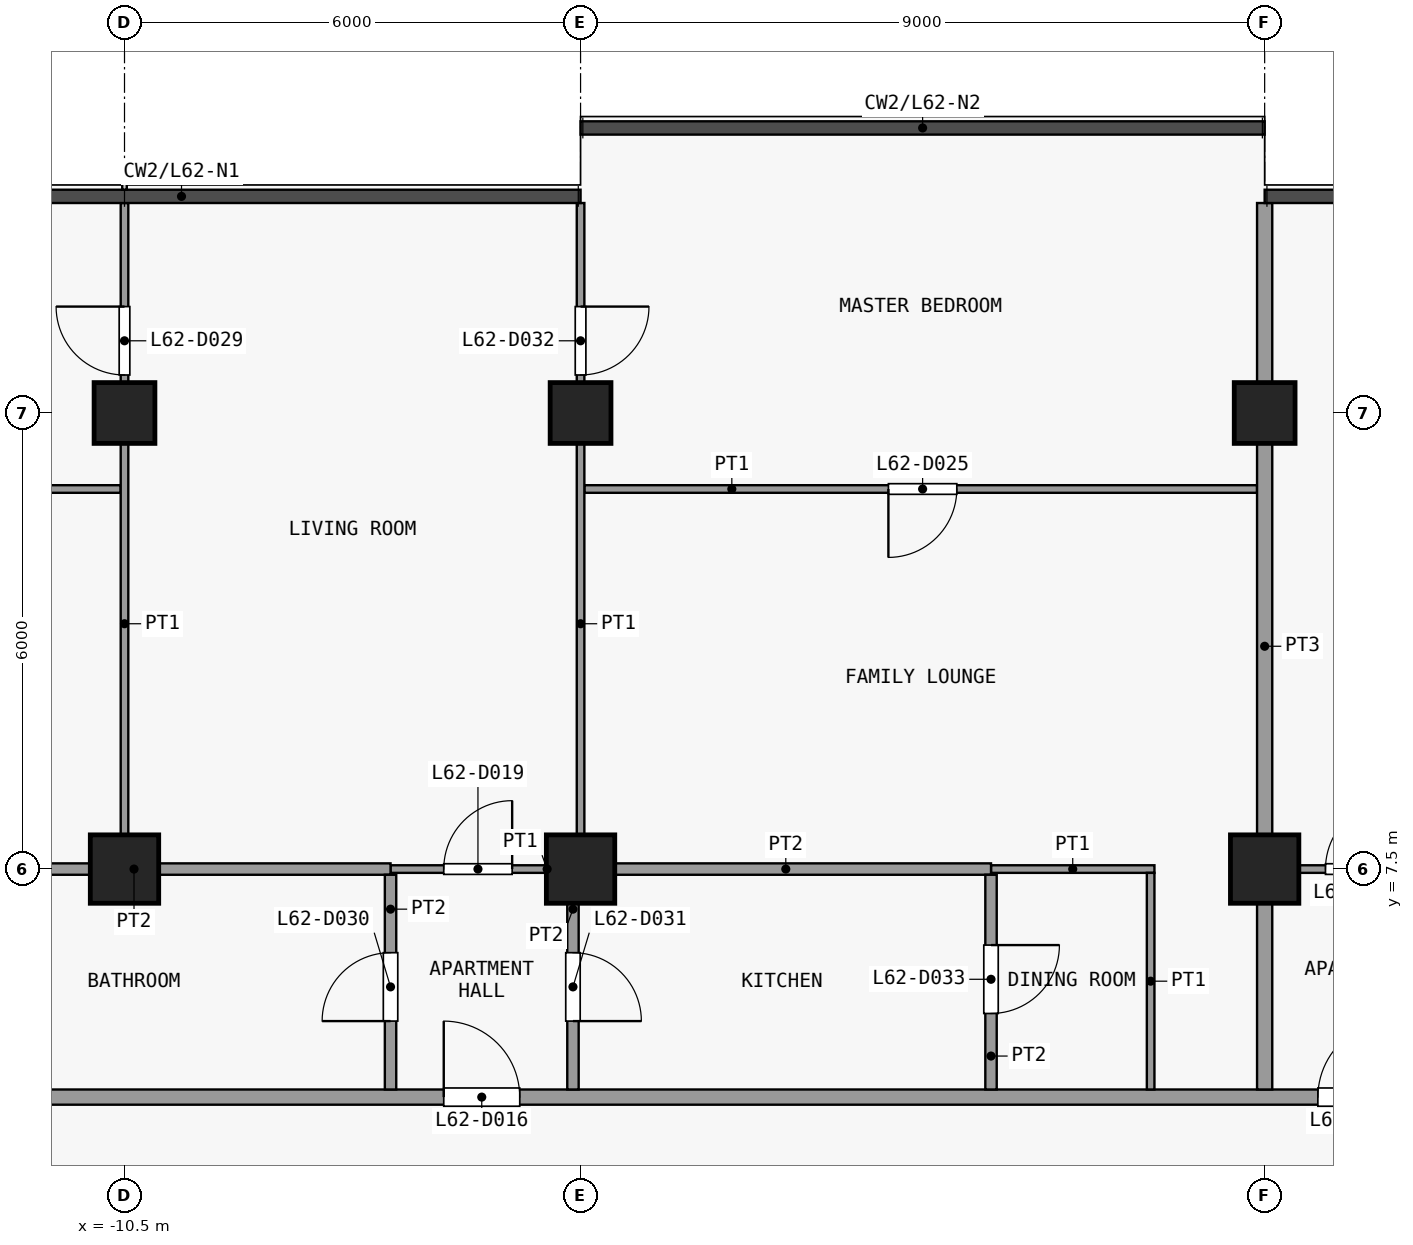
"""IFC4 building model, lengths in metres.
Left out: names, types, materials, properties, quantities, classifications, styles, units other than length and angle.
Written with IfcOpenShell. Run it as: python <this file> out.ifc"""

import sys

from ifc_helpers import new_model, si_unit, direction, frame, frame_2d, origin, origin_2d, place, context, subcontext, project, spatial, rectangle, extrude, element, fill, save


model = new_model("IFC4")
c1 = context("Model", 3, precision=1e-05, world=origin(), true_north=direction((0.0, 1.0)))
c2 = subcontext(c1, "Body", "Model", "MODEL_VIEW")
j1 = project(units=[si_unit("LENGTHUNIT", "METRE"), si_unit("PLANEANGLEUNIT", "RADIAN")], contexts=[c1])
p1 = place(None, origin())
s1 = spatial("IfcSite", under=j1, at=p1, CompositionType="ELEMENT")
p2 = place(p1, origin())
s2 = spatial("IfcBuilding", under=s1, at=p2, CompositionType="ELEMENT")
p3 = place(p2, frame((0.0, 0.0, 244.7)))
s3 = spatial("IfcBuildingStorey", under=s2, at=p3, CompositionType="ELEMENT", Elevation=244.7)
p4 = place(p3, frame((-10.5, 7.5, 0.0), z_axis=(0.0, 0.0, 1.0), x_axis=(1.0, 0.0, 0.0)))
e1 = element("IfcColumn", 1, at=p4, inside=s3, PredefinedType="COLUMN", context=c2, shape_type="SweptSolid", body=[
    extrude(rectangle(XDim=0.9, YDim=0.9, at=origin_2d()), origin(), (0.0, 0.0, 1.0), 3.6),
])
p5 = place(p3, frame((-10.5, 13.5, 0.0), z_axis=(0.0, 0.0, 1.0), x_axis=(1.0, 0.0, 0.0)))
e2 = element("IfcColumn", 2, at=p5, inside=s3, PredefinedType="COLUMN", context=c2, shape_type="SweptSolid", body=[
    extrude(rectangle(XDim=0.8, YDim=0.8, at=origin_2d()), origin(), (0.0, 0.0, 1.0), 3.6),
])
p6 = place(p3, frame((-4.5, 7.5, 0.0), z_axis=(0.0, 0.0, 1.0), x_axis=(1.0, 0.0, 0.0)))
e3 = element("IfcColumn", 3, at=p6, inside=s3, PredefinedType="COLUMN", context=c2, shape_type="SweptSolid", body=[
    extrude(rectangle(XDim=0.9, YDim=0.9, at=origin_2d()), origin(), (0.0, 0.0, 1.0), 3.6),
])
p7 = place(p3, frame((-4.5, 13.5, 0.0), z_axis=(0.0, 0.0, 1.0), x_axis=(1.0, 0.0, 0.0)))
e4 = element("IfcColumn", 4, at=p7, inside=s3, PredefinedType="COLUMN", context=c2, shape_type="SweptSolid", body=[
    extrude(rectangle(XDim=0.8, YDim=0.8, at=origin_2d()), origin(), (0.0, 0.0, 1.0), 3.6),
])
p8 = place(p3, frame((4.5, 7.5, 0.0), z_axis=(0.0, 0.0, 1.0), x_axis=(1.0, 0.0, 0.0)))
e5 = element("IfcColumn", 5, at=p8, inside=s3, PredefinedType="COLUMN", context=c2, shape_type="SweptSolid", body=[
    extrude(rectangle(XDim=0.9, YDim=0.9, at=origin_2d()), origin(), (0.0, 0.0, 1.0), 3.6),
])
p9 = place(p3, frame((4.5, 13.5, 0.0), z_axis=(0.0, 0.0, 1.0), x_axis=(1.0, 0.0, 0.0)))
e6 = element("IfcColumn", 6, at=p9, inside=s3, PredefinedType="COLUMN", context=c2, shape_type="SweptSolid", body=[
    extrude(rectangle(XDim=0.8, YDim=0.8, at=origin_2d()), origin(), (0.0, 0.0, 1.0), 3.6),
])
p10 = place(p3, frame((-17.85, 4.5, 0.0), z_axis=(0.0, 0.0, 1.0), x_axis=(1.0, 0.0, 0.0)))
e7 = element("IfcWall", 7, at=p10, inside=s3, PredefinedType="PARTITIONING", context=c2, shape_type="SweptSolid", body=[
    extrude(rectangle(XDim=37.2, YDim=0.2, at=frame_2d((18.6, 0.0))), origin(), (0.0, 0.0, 1.0), 3.15),
])
p11 = place(p10, frame((11.55, 0.0, 0.0)))
e8 = element("IfcOpeningElement", 8, at=p11, cuts=e7, PredefinedType="OPENING", context=c2, shape_type="SweptSolid", body=[
    extrude(rectangle(XDim=1.0, YDim=2.1, at=frame_2d((0.5, 1.05))), frame((0.0, 0.11, 0.0), z_axis=(0.0, -1.0, 0.0), x_axis=(1.0, 0.0, 0.0)), (0.0, 0.0, 1.0), 0.22),
])
p12 = place(p10, frame((23.05, 0.0, 0.0)))
e9 = element("IfcOpeningElement", 9, at=p12, cuts=e7, PredefinedType="OPENING", context=c2, shape_type="SweptSolid", body=[
    extrude(rectangle(XDim=1.0, YDim=2.1, at=frame_2d((0.5, 1.05))), frame((0.0, 0.11, 0.0), z_axis=(0.0, -1.0, 0.0), x_axis=(1.0, 0.0, 0.0)), (0.0, 0.0, 1.0), 0.22),
])
p13 = place(p10, frame((31.55, 0.0, 0.0)))
e10 = element("IfcOpeningElement", 10, at=p13, cuts=e7, PredefinedType="OPENING", context=c2, shape_type="SweptSolid", body=[
    extrude(rectangle(XDim=1.0, YDim=2.1, at=frame_2d((0.5, 1.05))), frame((0.0, 0.11, 0.0), z_axis=(0.0, -1.0, 0.0), x_axis=(1.0, 0.0, 0.0)), (0.0, 0.0, 1.0), 0.22),
])
p14 = place(p3, frame((-7.0, 7.5, 0.0), z_axis=(0.0, 0.0, 1.0), x_axis=(1.0, 0.0, 0.0)))
e11 = element("IfcWall", 11, at=p14, inside=s3, PredefinedType="PARTITIONING", context=c2, shape_type="SweptSolid", body=[
    extrude(rectangle(XDim=2.4, YDim=0.1, at=frame_2d((1.2, 0.0))), origin(), (0.0, 0.0, 1.0), 3.15),
])
p15 = place(p14, frame((0.7, 0.0, 0.0)))
e12 = element("IfcOpeningElement", 12, at=p15, cuts=e11, PredefinedType="OPENING", context=c2, shape_type="SweptSolid", body=[
    extrude(rectangle(XDim=0.9, YDim=2.1, at=frame_2d((0.45, 1.05))), frame((0.0, 0.06, 0.0), z_axis=(0.0, -1.0, 0.0), x_axis=(1.0, 0.0, 0.0)), (0.0, 0.0, 1.0), 0.12),
])
p16 = place(p3, frame((0.9, 7.5, 0.0), z_axis=(0.0, 0.0, 1.0), x_axis=(1.0, 0.0, 0.0)))
e13 = element("IfcWall", 13, at=p16, inside=s3, PredefinedType="PARTITIONING", context=c2, shape_type="SweptSolid", body=[
    extrude(rectangle(XDim=2.15, YDim=0.1, at=frame_2d((1.075, 0.0))), origin(), (0.0, 0.0, 1.0), 3.15),
])
p17 = place(p3, frame((4.6, 7.5, 0.0), z_axis=(0.0, 0.0, 1.0), x_axis=(1.0, 0.0, 0.0)))
e14 = element("IfcWall", 14, at=p17, inside=s3, PredefinedType="PARTITIONING", context=c2, shape_type="SweptSolid", body=[
    extrude(rectangle(XDim=2.3, YDim=0.1, at=frame_2d((1.15, 0.0))), origin(), (0.0, 0.0, 1.0), 3.15),
])
p18 = place(p17, frame((0.7, 0.0, 0.0)))
e15 = element("IfcOpeningElement", 15, at=p18, cuts=e14, PredefinedType="OPENING", context=c2, shape_type="SweptSolid", body=[
    extrude(rectangle(XDim=0.9, YDim=2.1, at=frame_2d((0.45, 1.05))), frame((0.0, 0.06, 0.0), z_axis=(0.0, -1.0, 0.0), x_axis=(1.0, 0.0, 0.0)), (0.0, 0.0, 1.0), 0.12),
])
p19 = place(p3, frame((-13.75, 7.5, 0.0), z_axis=(0.0, 0.0, 1.0), x_axis=(1.0, 0.0, 0.0)))
e16 = element("IfcWall", 16, at=p19, inside=s3, PredefinedType="PARTITIONING", context=c2, shape_type="SweptSolid", body=[
    extrude(rectangle(XDim=6.75, YDim=0.15, at=frame_2d((3.375, 0.0))), origin(), (0.0, 0.0, 1.0), 3.15),
])
p20 = place(p3, frame((-4.5, 7.5, 0.0), z_axis=(0.0, 0.0, 1.0), x_axis=(1.0, 0.0, 0.0)))
e17 = element("IfcWall", 17, at=p20, inside=s3, PredefinedType="PARTITIONING", context=c2, shape_type="SweptSolid", body=[
    extrude(rectangle(XDim=5.4, YDim=0.15, at=frame_2d((2.7, 0.0))), origin(), (0.0, 0.0, 1.0), 3.15),
])
p21 = place(p3, frame((-14.85, 12.5, 0.0), z_axis=(0.0, 0.0, 1.0), x_axis=(1.0, 0.0, 0.0)))
e18 = element("IfcWall", 18, at=p21, inside=s3, PredefinedType="PARTITIONING", context=c2, shape_type="SweptSolid", body=[
    extrude(rectangle(XDim=4.3, YDim=0.1, at=frame_2d((2.15, 0.0))), origin(), (0.0, 0.0, 1.0), 3.15),
])
p22 = place(p21, frame((1.7, 0.0, 0.0)))
e19 = element("IfcOpeningElement", 19, at=p22, cuts=e18, PredefinedType="OPENING", context=c2, shape_type="SweptSolid", body=[
    extrude(rectangle(XDim=0.9, YDim=2.1, at=frame_2d((0.45, 1.05))), frame((0.0, 0.06, 0.0), z_axis=(0.0, -1.0, 0.0), x_axis=(1.0, 0.0, 0.0)), (0.0, 0.0, 1.0), 0.12),
])
p23 = place(p3, frame((-4.45, 12.5, 0.0), z_axis=(0.0, 0.0, 1.0), x_axis=(1.0, 0.0, 0.0)))
e20 = element("IfcWall", 20, at=p23, inside=s3, PredefinedType="PARTITIONING", context=c2, shape_type="SweptSolid", body=[
    extrude(rectangle(XDim=8.85, YDim=0.1, at=frame_2d((4.425, 0.0))), origin(), (0.0, 0.0, 1.0), 3.15),
])
p24 = place(p23, frame((4.0, 0.0, 0.0)))
e21 = element("IfcOpeningElement", 21, at=p24, cuts=e20, PredefinedType="OPENING", context=c2, shape_type="SweptSolid", body=[
    extrude(rectangle(XDim=0.9, YDim=2.1, at=frame_2d((0.45, 1.05))), frame((0.0, 0.06, 0.0), z_axis=(0.0, -1.0, 0.0), x_axis=(1.0, 0.0, 0.0)), (0.0, 0.0, 1.0), 0.12),
])
p25 = place(p3, frame((-10.5, 7.575, 0.0), z_axis=(0.0, 0.0, 1.0), x_axis=(0.0, 1.0, 0.0)))
e22 = element("IfcWall", 22, at=p25, inside=s3, PredefinedType="PARTITIONING", context=c2, shape_type="SweptSolid", body=[
    extrude(rectangle(XDim=8.688, YDim=0.1, at=frame_2d((4.344, 0.0))), origin(), (0.0, 0.0, 1.0), 3.15),
])
p26 = place(p25, frame((6.425, 0.0, 0.0)))
e23 = element("IfcOpeningElement", 23, at=p26, cuts=e22, PredefinedType="OPENING", context=c2, shape_type="SweptSolid", body=[
    extrude(rectangle(XDim=0.9, YDim=2.1, at=frame_2d((0.45, 1.05))), frame((0.0, 0.06, 0.0), z_axis=(0.0, -1.0, 0.0), x_axis=(1.0, 0.0, 0.0)), (0.0, 0.0, 1.0), 0.12),
])
p27 = place(p3, frame((-7.0, 4.6, 0.0), z_axis=(0.0, 0.0, 1.0), x_axis=(0.0, 1.0, 0.0)))
e24 = element("IfcWall", 24, at=p27, inside=s3, PredefinedType="PARTITIONING", context=c2, shape_type="SweptSolid", body=[
    extrude(rectangle(XDim=2.825, YDim=0.15, at=frame_2d((1.413, 0.0))), origin(), (0.0, 0.0, 1.0), 3.15),
])
p28 = place(p27, frame((0.9, 0.0, 0.0)))
e25 = element("IfcOpeningElement", 25, at=p28, cuts=e24, PredefinedType="OPENING", context=c2, shape_type="SweptSolid", body=[
    extrude(rectangle(XDim=0.9, YDim=2.1, at=frame_2d((0.45, 1.05))), frame((0.0, 0.085, 0.0), z_axis=(0.0, -1.0, 0.0), x_axis=(1.0, 0.0, 0.0)), (0.0, 0.0, 1.0), 0.17),
])
p29 = place(p3, frame((-4.6, 4.6, 0.0), z_axis=(0.0, 0.0, 1.0), x_axis=(0.0, 1.0, 0.0)))
e26 = element("IfcWall", 26, at=p29, inside=s3, PredefinedType="PARTITIONING", context=c2, shape_type="SweptSolid", body=[
    extrude(rectangle(XDim=2.825, YDim=0.15, at=frame_2d((1.413, 0.0))), origin(), (0.0, 0.0, 1.0), 3.15),
])
p30 = place(p29, frame((0.9, 0.0, 0.0)))
e27 = element("IfcOpeningElement", 27, at=p30, cuts=e26, PredefinedType="OPENING", context=c2, shape_type="SweptSolid", body=[
    extrude(rectangle(XDim=0.9, YDim=2.1, at=frame_2d((0.45, 1.05))), frame((0.0, 0.085, 0.0), z_axis=(0.0, -1.0, 0.0), x_axis=(1.0, 0.0, 0.0)), (0.0, 0.0, 1.0), 0.17),
])
p31 = place(p3, frame((-4.5, 7.575, 0.0), z_axis=(0.0, 0.0, 1.0), x_axis=(0.0, 1.0, 0.0)))
e28 = element("IfcWall", 28, at=p31, inside=s3, PredefinedType="PARTITIONING", context=c2, shape_type="SweptSolid", body=[
    extrude(rectangle(XDim=8.688, YDim=0.1, at=frame_2d((4.344, 0.0))), origin(), (0.0, 0.0, 1.0), 3.15),
])
p32 = place(p31, frame((6.425, 0.0, 0.0)))
e29 = element("IfcOpeningElement", 29, at=p32, cuts=e28, PredefinedType="OPENING", context=c2, shape_type="SweptSolid", body=[
    extrude(rectangle(XDim=0.9, YDim=2.1, at=frame_2d((0.45, 1.05))), frame((0.0, 0.06, 0.0), z_axis=(0.0, -1.0, 0.0), x_axis=(1.0, 0.0, 0.0)), (0.0, 0.0, 1.0), 0.12),
])
p33 = place(p3, frame((0.9, 4.6, 0.0), z_axis=(0.0, 0.0, 1.0), x_axis=(0.0, 1.0, 0.0)))
e30 = element("IfcWall", 30, at=p33, inside=s3, PredefinedType="PARTITIONING", context=c2, shape_type="SweptSolid", body=[
    extrude(rectangle(XDim=2.825, YDim=0.15, at=frame_2d((1.413, 0.0))), origin(), (0.0, 0.0, 1.0), 3.15),
])
p34 = place(p33, frame((1.0, 0.0, 0.0)))
e31 = element("IfcOpeningElement", 31, at=p34, cuts=e30, PredefinedType="OPENING", context=c2, shape_type="SweptSolid", body=[
    extrude(rectangle(XDim=0.9, YDim=2.1, at=frame_2d((0.45, 1.05))), frame((0.0, 0.085, 0.0), z_axis=(0.0, -1.0, 0.0), x_axis=(1.0, 0.0, 0.0)), (0.0, 0.0, 1.0), 0.17),
])
p35 = place(p3, frame((3.0, 4.6, 0.0), z_axis=(0.0, 0.0, 1.0), x_axis=(0.0, 1.0, 0.0)))
e32 = element("IfcWall", 32, at=p35, inside=s3, PredefinedType="PARTITIONING", context=c2, shape_type="SweptSolid", body=[
    extrude(rectangle(XDim=2.85, YDim=0.1, at=frame_2d((1.425, 0.0))), origin(), (0.0, 0.0, 1.0), 3.15),
])
p36 = place(p3, frame((4.5, 4.6, 0.0), z_axis=(0.0, 0.0, 1.0), x_axis=(0.0, 1.0, 0.0)))
e33 = element("IfcWall", 33, at=p36, inside=s3, PredefinedType="PARTITIONING", context=c2, shape_type="SweptSolid", body=[
    extrude(rectangle(XDim=11.662, YDim=0.2, at=frame_2d((5.831, 0.0))), origin(), (0.0, 0.0, 1.0), 3.15),
])
p37 = place(p11, origin())
e34 = element("IfcDoor", 34, at=p37, inside=s3, OperationType="SINGLE_SWING_RIGHT", PredefinedType="DOOR", context=c2, shape_type="SweptSolid", body=[
    extrude(rectangle(XDim=1.0, YDim=2.1, at=frame_2d((0.5, 1.05))), frame((0.0, 0.025, 0.0), z_axis=(0.0, -1.0, 0.0), x_axis=(1.0, 0.0, 0.0)), (0.0, 0.0, 1.0), 0.05),
])
fill(e8, e34)
p38 = place(p12, origin())
e35 = element("IfcDoor", 35, at=p38, inside=s3, OperationType="SINGLE_SWING_LEFT", PredefinedType="DOOR", context=c2, shape_type="SweptSolid", body=[
    extrude(rectangle(XDim=1.0, YDim=2.1, at=frame_2d((0.5, 1.05))), frame((0.0, 0.025, 0.0), z_axis=(0.0, -1.0, 0.0), x_axis=(1.0, 0.0, 0.0)), (0.0, 0.0, 1.0), 0.05),
])
fill(e9, e35)
p39 = place(p15, origin())
e36 = element("IfcDoor", 36, at=p39, inside=s3, OperationType="SINGLE_SWING_LEFT", PredefinedType="DOOR", context=c2, shape_type="SweptSolid", body=[
    extrude(rectangle(XDim=0.9, YDim=2.1, at=frame_2d((0.45, 1.05))), frame((0.0, 0.025, 0.0), z_axis=(0.0, -1.0, 0.0), x_axis=(1.0, 0.0, 0.0)), (0.0, 0.0, 1.0), 0.05),
])
fill(e12, e36)
p40 = place(p18, origin())
e37 = element("IfcDoor", 37, at=p40, inside=s3, OperationType="SINGLE_SWING_LEFT", PredefinedType="DOOR", context=c2, shape_type="SweptSolid", body=[
    extrude(rectangle(XDim=0.9, YDim=2.1, at=frame_2d((0.45, 1.05))), frame((0.0, 0.025, 0.0), z_axis=(0.0, -1.0, 0.0), x_axis=(1.0, 0.0, 0.0)), (0.0, 0.0, 1.0), 0.05),
])
fill(e15, e37)
p41 = place(p24, origin())
e38 = element("IfcDoor", 38, at=p41, inside=s3, OperationType="SINGLE_SWING_LEFT", PredefinedType="DOOR", context=c2, shape_type="SweptSolid", body=[
    extrude(rectangle(XDim=0.9, YDim=2.1, at=frame_2d((0.45, 1.05))), frame((0.0, 0.025, 0.0), z_axis=(0.0, -1.0, 0.0), x_axis=(1.0, 0.0, 0.0)), (0.0, 0.0, 1.0), 0.05),
])
fill(e21, e38)
p42 = place(p26, origin())
e39 = element("IfcDoor", 39, at=p42, inside=s3, OperationType="SINGLE_SWING_LEFT", PredefinedType="DOOR", context=c2, shape_type="SweptSolid", body=[
    extrude(rectangle(XDim=0.9, YDim=2.1, at=frame_2d((0.45, 1.05))), frame((0.0, 0.025, 0.0), z_axis=(0.0, -1.0, 0.0), x_axis=(1.0, 0.0, 0.0)), (0.0, 0.0, 1.0), 0.05),
])
fill(e23, e39)
p43 = place(p28, origin())
e40 = element("IfcDoor", 40, at=p43, inside=s3, OperationType="SINGLE_SWING_RIGHT", PredefinedType="DOOR", context=c2, shape_type="SweptSolid", body=[
    extrude(rectangle(XDim=0.9, YDim=2.1, at=frame_2d((0.45, 1.05))), frame((0.0, 0.025, 0.0), z_axis=(0.0, -1.0, 0.0), x_axis=(1.0, 0.0, 0.0)), (0.0, 0.0, 1.0), 0.05),
])
fill(e25, e40)
p44 = place(p30, origin())
e41 = element("IfcDoor", 41, at=p44, inside=s3, OperationType="SINGLE_SWING_LEFT", PredefinedType="DOOR", context=c2, shape_type="SweptSolid", body=[
    extrude(rectangle(XDim=0.9, YDim=2.1, at=frame_2d((0.45, 1.05))), frame((0.0, 0.025, 0.0), z_axis=(0.0, -1.0, 0.0), x_axis=(1.0, 0.0, 0.0)), (0.0, 0.0, 1.0), 0.05),
])
fill(e27, e41)
p45 = place(p32, origin())
e42 = element("IfcDoor", 42, at=p45, inside=s3, OperationType="SINGLE_SWING_RIGHT", PredefinedType="DOOR", context=c2, shape_type="SweptSolid", body=[
    extrude(rectangle(XDim=0.9, YDim=2.1, at=frame_2d((0.45, 1.05))), frame((0.0, 0.025, 0.0), z_axis=(0.0, -1.0, 0.0), x_axis=(1.0, 0.0, 0.0)), (0.0, 0.0, 1.0), 0.05),
])
fill(e29, e42)
p46 = place(p34, origin())
e43 = element("IfcDoor", 43, at=p46, inside=s3, OperationType="SINGLE_SWING_RIGHT", PredefinedType="DOOR", context=c2, shape_type="SweptSolid", body=[
    extrude(rectangle(XDim=0.9, YDim=2.1, at=frame_2d((0.45, 1.05))), frame((0.0, 0.025, 0.0), z_axis=(0.0, -1.0, 0.0), x_axis=(1.0, 0.0, 0.0)), (0.0, 0.0, 1.0), 0.05),
])
fill(e31, e43)
save(model, sys.argv[1])
